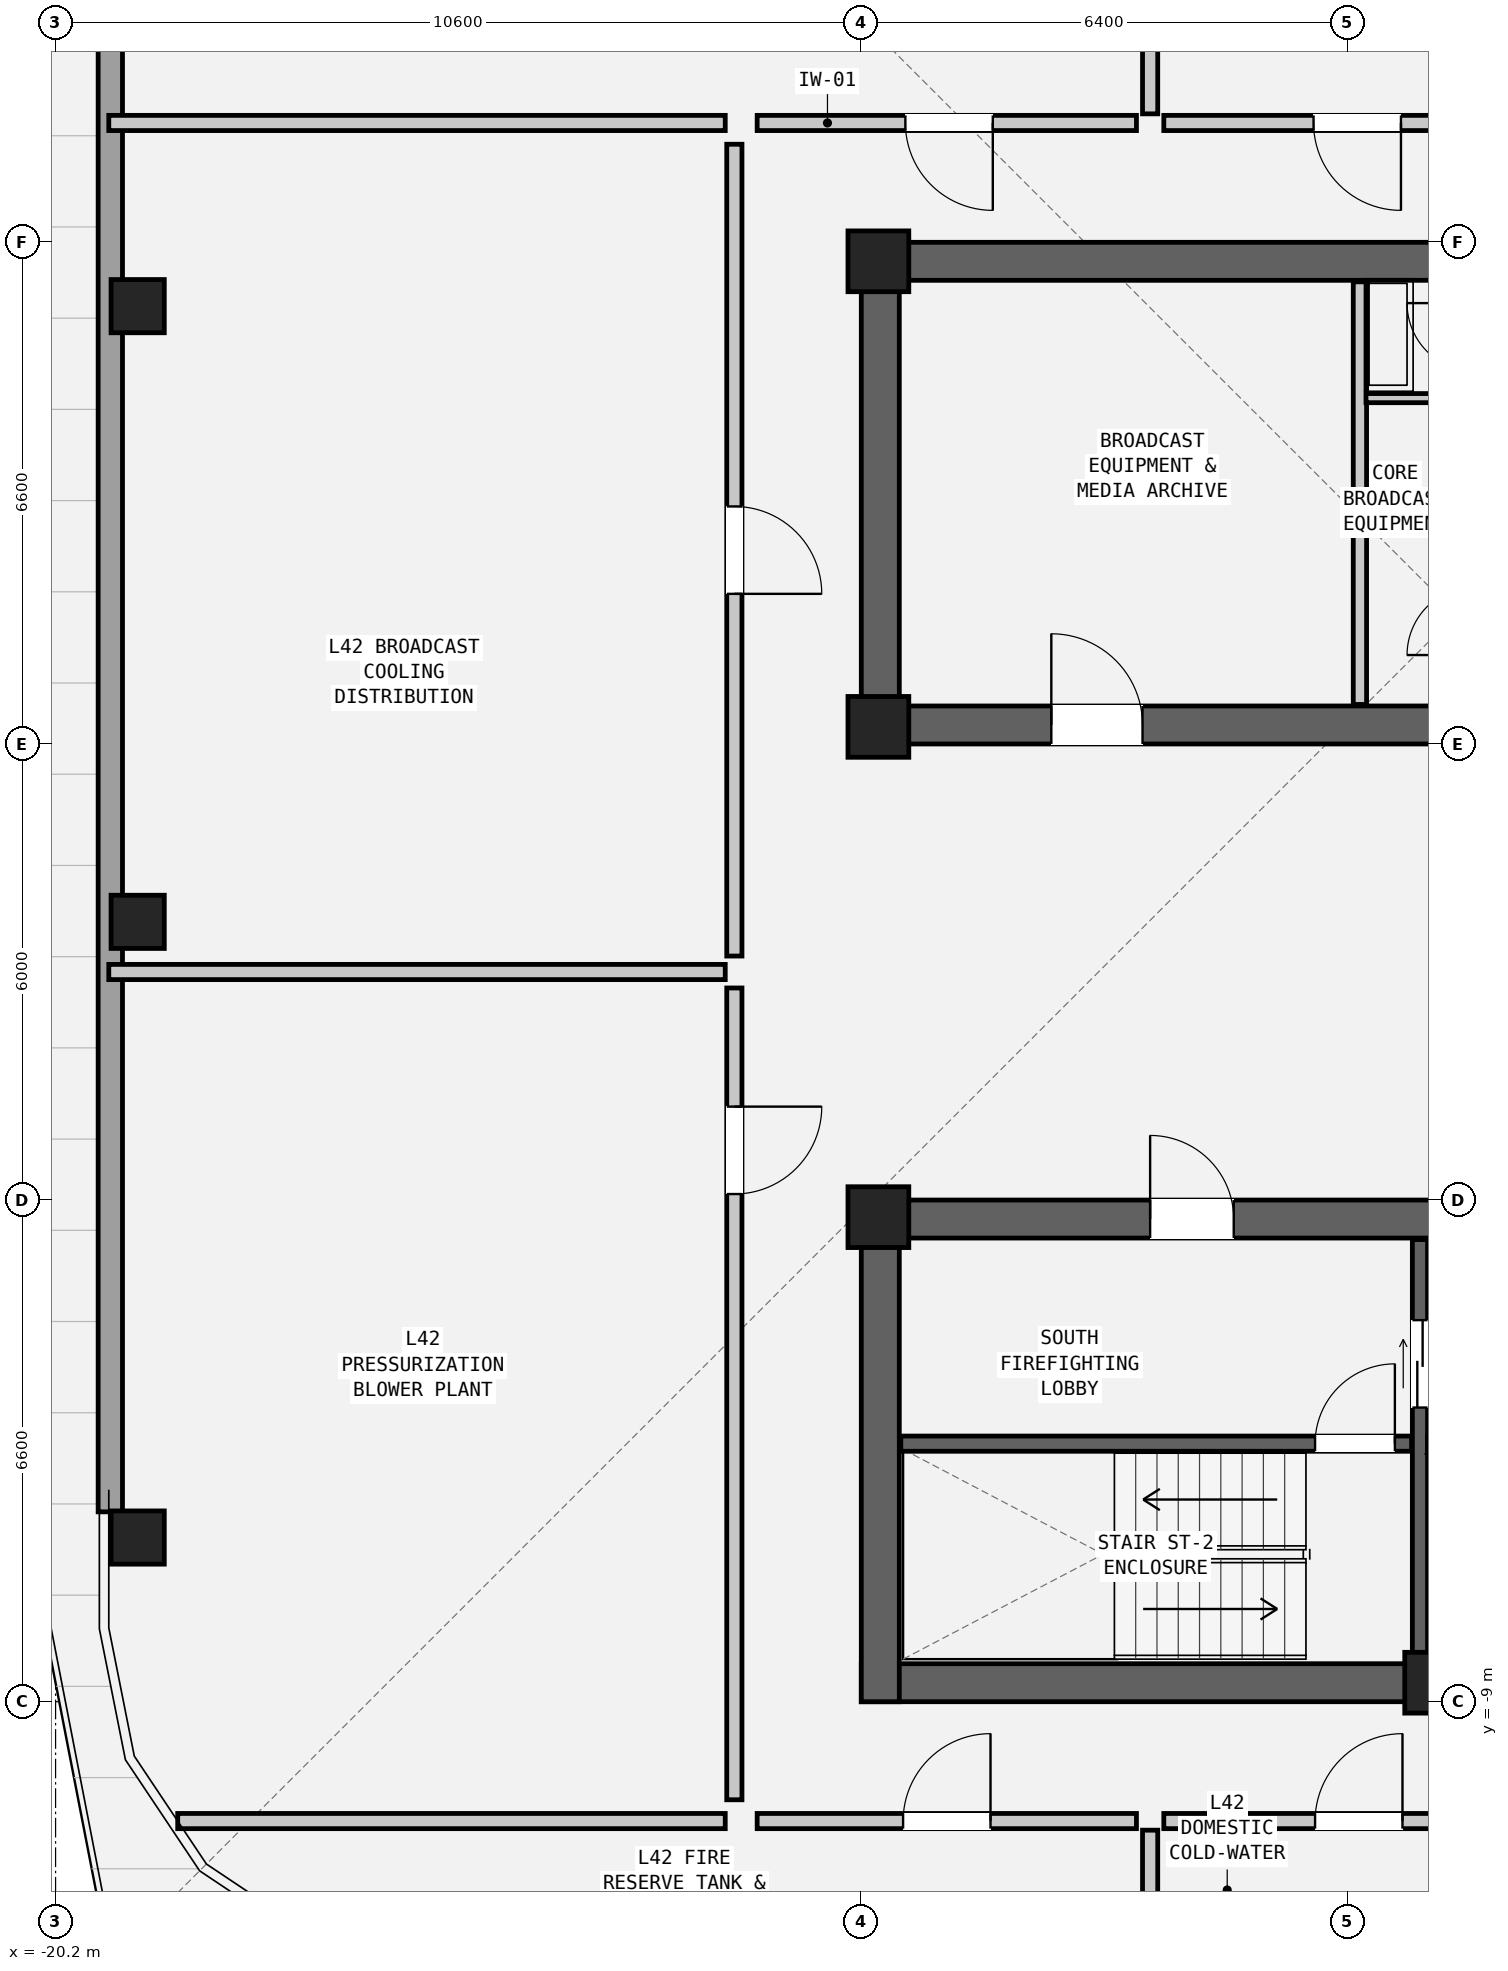
"""IFC4 building model, lengths in metres.
Left out: names, types, materials, properties, quantities, classifications, styles, units other than length and angle.
Written with IfcOpenShell. Run it as: python <this file> out.ifc"""

import sys

from ifc_helpers import new_model, si_unit, direction, frame, frame_2d, origin, origin_2d, place, context, subcontext, project, spatial, rectangle, hollow_rectangle, extrude, element, fill, save


model = new_model("IFC4")
c1 = context("Model", 3, precision=1e-05, world=origin(), true_north=direction((0.0, 1.0)))
c2 = subcontext(c1, "Body", "Model", "MODEL_VIEW")
j1 = project(units=[si_unit("LENGTHUNIT", "METRE"), si_unit("PLANEANGLEUNIT", "RADIAN")], contexts=[c1])
p1 = place(None, origin())
s1 = spatial("IfcSite", under=j1, at=p1, CompositionType="ELEMENT")
p2 = place(p1, origin())
s2 = spatial("IfcBuilding", under=s1, at=p2, CompositionType="ELEMENT")
p3 = place(p2, frame((0.0, 0.0, 144.6)))
s3 = spatial("IfcBuildingStorey", under=s2, at=p3, CompositionType="ELEMENT", Elevation=144.6)
p4 = place(p3, frame((-9.6, 9.95, 0.0), z_axis=(0.0, 0.0, 1.0), x_axis=(1.0, 0.0, 0.0)))
e1 = element("IfcWall", 1, at=p4, inside=s3, PredefinedType="SHEAR", context=c2, shape_type="SweptSolid", body=[
    extrude(rectangle(XDim=19.2, YDim=0.5, at=frame_2d((9.6, 0.0))), origin(), (0.0, 0.0, 1.0), 3.6),
])
p5 = place(p3, frame((-9.6, 3.85, 0.0), z_axis=(0.0, 0.0, 1.0), x_axis=(1.0, 0.0, 0.0)))
e2 = element("IfcWall", 2, at=p5, inside=s3, PredefinedType="SHEAR", context=c2, shape_type="SweptSolid", body=[
    extrude(rectangle(XDim=19.2, YDim=0.5, at=frame_2d((9.6, 0.0))), origin(), (0.0, 0.0, 1.0), 3.6),
])
p6 = place(p5, frame((14.2, 0.0, 0.0)))
e3 = element("IfcOpeningElement", 3, at=p6, cuts=e2, PredefinedType="OPENING", context=c2, shape_type="SweptSolid", body=[
    extrude(rectangle(XDim=1.1, YDim=2.08, at=frame_2d((0.55, 1.04))), frame((0.0, 0.262, 0.0), z_axis=(0.0, -1.0, 0.0), x_axis=(1.0, 0.0, 0.0)), (0.0, 0.0, 1.0), 0.524),
])
p7 = place(p5, frame((8.2, 0.0, 0.0)))
e4 = element("IfcOpeningElement", 4, at=p7, cuts=e2, PredefinedType="OPENING", context=c2, shape_type="SweptSolid", body=[
    extrude(rectangle(XDim=1.15, YDim=2.1, at=frame_2d((0.575, 1.05))), frame((0.0, 0.262, 0.0), z_axis=(0.0, -1.0, 0.0), x_axis=(1.0, 0.0, 0.0)), (0.0, 0.0, 1.0), 0.524),
])
p8 = place(p5, frame((2.5, 0.0, 0.0)))
e5 = element("IfcOpeningElement", 5, at=p8, cuts=e2, PredefinedType="OPENING", context=c2, shape_type="SweptSolid", body=[
    extrude(rectangle(XDim=1.2, YDim=2.1, at=frame_2d((0.6, 1.05))), frame((0.0, 0.262, 0.0), z_axis=(0.0, -1.0, 0.0), x_axis=(1.0, 0.0, 0.0)), (0.0, 0.0, 1.0), 0.524),
])
p9 = place(p3, frame((-9.35, 3.6, 0.0), z_axis=(0.0, 0.0, 1.0), x_axis=(0.0, 1.0, 0.0)))
e6 = element("IfcWall", 6, at=p9, inside=s3, PredefinedType="SHEAR", context=c2, shape_type="SweptSolid", body=[
    extrude(rectangle(XDim=6.6, YDim=0.5, at=frame_2d((3.3, 0.0))), origin(), (0.0, 0.0, 1.0), 3.6),
])
p10 = place(p3, frame((-9.6, -8.75, 0.0), z_axis=(0.0, 0.0, 1.0), x_axis=(1.0, 0.0, 0.0)))
e7 = element("IfcWall", 7, at=p10, inside=s3, PredefinedType="SHEAR", context=c2, shape_type="SweptSolid", body=[
    extrude(rectangle(XDim=19.2, YDim=0.5, at=frame_2d((9.6, 0.0))), origin(), (0.0, 0.0, 1.0), 3.6),
])
p11 = place(p3, frame((-9.6, -2.65, 0.0), z_axis=(0.0, 0.0, 1.0), x_axis=(1.0, 0.0, 0.0)))
e8 = element("IfcWall", 8, at=p11, inside=s3, PredefinedType="SHEAR", context=c2, shape_type="SweptSolid", body=[
    extrude(rectangle(XDim=19.2, YDim=0.5, at=frame_2d((9.6, 0.0))), origin(), (0.0, 0.0, 1.0), 3.6),
])
p12 = place(p11, frame((3.8, 0.0, 0.0)))
e9 = element("IfcOpeningElement", 9, at=p12, cuts=e8, PredefinedType="OPENING", context=c2, shape_type="SweptSolid", body=[
    extrude(rectangle(XDim=1.1, YDim=2.08, at=frame_2d((0.55, 1.04))), frame((0.0, 0.262, 0.0), z_axis=(0.0, -1.0, 0.0), x_axis=(1.0, 0.0, 0.0)), (0.0, 0.0, 1.0), 0.524),
])
p13 = place(p11, frame((13.0, 0.0, 0.0)))
e10 = element("IfcOpeningElement", 10, at=p13, cuts=e8, PredefinedType="OPENING", context=c2, shape_type="SweptSolid", body=[
    extrude(rectangle(XDim=1.6, YDim=2.12, at=frame_2d((0.8, 1.06))), frame((0.0, 0.262, 0.0), z_axis=(0.0, -1.0, 0.0), x_axis=(1.0, 0.0, 0.0)), (0.0, 0.0, 1.0), 0.524),
])
p14 = place(p3, frame((-9.35, -9.0, 0.0), z_axis=(0.0, 0.0, 1.0), x_axis=(0.0, 1.0, 0.0)))
e11 = element("IfcWall", 11, at=p14, inside=s3, PredefinedType="SHEAR", context=c2, shape_type="SweptSolid", body=[
    extrude(rectangle(XDim=6.6, YDim=0.5, at=frame_2d((3.3, 0.0))), origin(), (0.0, 0.0, 1.0), 3.6),
])
for number, where, z_axis, x_axis in (
    (12, (-19.12, 9.36, 0.0), (0.0, 0.0, 1.0), (0.0, 1.0, 0.0)),
    (13, (-19.12, 1.26, 0.0), (0.0, 0.0, 1.0), (0.0, 1.0, 0.0)),
    (14, (-19.12, -6.84, 0.0), (0.0, 0.0, 1.0), (0.0, 1.0, 0.0)),
):
    element("IfcColumn", number, at=place(p3, frame(where, z_axis=z_axis, x_axis=x_axis)), inside=s3, PredefinedType="COLUMN", context=c2, shape_type="SweptSolid", body=[
        extrude(hollow_rectangle(XDim=0.7, YDim=0.7, WallThickness=0.045, at=origin_2d()), origin(), (0.0, 0.0, 1.0), 3.6),
    ])
for number, where, z_axis, x_axis in (
    (15, (-9.375, 9.95, 0.0), (0.0, 0.0, 1.0), (1.0, 0.0, 0.0)),
    (16, (-9.375, 3.825, 0.0), (0.0, 0.0, 1.0), (1.0, 0.0, 0.0)),
    (17, (-9.375, -2.625, 0.0), (0.0, 0.0, 1.0), (1.0, 0.0, 0.0)),
    (18, (-2.05, -8.75, 0.0), (0.0, 0.0, 1.0), (1.0, 0.0, 0.0)),
):
    element("IfcColumn", number, at=place(p3, frame(where, z_axis=z_axis, x_axis=x_axis)), inside=s3, PredefinedType="COLUMN", context=c2, shape_type="SweptSolid", body=[
        extrude(rectangle(XDim=0.8, YDim=0.8, at=origin_2d()), origin(), (0.0, 0.0, 1.0), 3.6),
    ])
p15 = place(p3, frame((-19.48, -6.502, 0.0), z_axis=(0.0, 0.0, 1.0), x_axis=(0.0, 1.0, 0.0)))
e19 = element("IfcWall", 19, at=p15, inside=s3, PredefinedType="SOLIDWALL", context=c2, shape_type="SweptSolid", body=[
    extrude(rectangle(XDim=23.624, YDim=0.32, at=frame_2d((11.812, 0.0))), origin(), (0.0, 0.0, 1.0), 2.242),
])
p16 = place(p3, frame((-3.04, 4.12, 0.0), z_axis=(0.0, 0.0, 1.0), x_axis=(0.0, 1.0, 0.0)))
e20 = element("IfcWall", 20, at=p16, inside=s3, PredefinedType="PARTITIONING", context=c2, shape_type="SweptSolid", body=[
    extrude(rectangle(XDim=5.56, YDim=0.175, at=frame_2d((2.78, 0.0))), origin(), (0.0, 0.0, 1.0), 3.38),
])
p17 = place(p3, frame((-2.96, 8.15, 0.0), z_axis=(0.0, 0.0, 1.0), x_axis=(1.0, 0.0, 0.0)))
e21 = element("IfcWall", 21, at=p17, inside=s3, PredefinedType="PARTITIONING", context=c2, shape_type="SweptSolid", body=[
    extrude(rectangle(XDim=1.36, YDim=0.12, at=frame_2d((0.68, 0.0))), origin(), (0.0, 0.0, 1.0), 3.38),
])
p18 = place(p3, frame((-9.08, -5.605, 0.0), z_axis=(0.0, 0.0, 1.0), x_axis=(1.0, 0.0, 0.0)))
e22 = element("IfcWall", 22, at=p18, inside=s3, PredefinedType="SHEAR", context=c2, shape_type="SweptSolid", body=[
    extrude(rectangle(XDim=6.72, YDim=0.2, at=frame_2d((3.36, 0.0))), origin(), (0.0, 0.0, 1.0), 3.38),
])
p19 = place(p18, frame((5.45, 0.0, 0.0)))
e23 = element("IfcOpeningElement", 23, at=p19, cuts=e22, PredefinedType="OPENING", context=c2, shape_type="SweptSolid", body=[
    extrude(rectangle(XDim=1.05, YDim=2.08, at=frame_2d((0.525, 1.04))), frame((0.0, 0.112, 0.0), z_axis=(0.0, -1.0, 0.0), x_axis=(1.0, 0.0, 0.0)), (0.0, 0.0, 1.0), 0.224),
])
p20 = place(p3, frame((-2.25, -8.48, 0.0), z_axis=(0.0, 0.0, 1.0), x_axis=(0.0, 1.0, 0.0)))
e24 = element("IfcWall", 24, at=p20, inside=s3, PredefinedType="SHEAR", context=c2, shape_type="SweptSolid", body=[
    extrude(rectangle(XDim=5.56, YDim=0.2, at=frame_2d((2.78, 0.0))), origin(), (0.0, 0.0, 1.0), 3.38),
])
p21 = place(p20, frame((3.35, 0.0, 0.0)))
e25 = element("IfcOpeningElement", 25, at=p21, cuts=e24, PredefinedType="OPENING", context=c2, shape_type="SweptSolid", body=[
    extrude(rectangle(XDim=1.15, YDim=2.08, at=frame_2d((0.575, 1.04))), frame((0.0, 0.112, 0.0), z_axis=(0.0, -1.0, 0.0), x_axis=(1.0, 0.0, 0.0)), (0.0, 0.0, 1.0), 0.224),
])
p22 = place(p3, frame((-2.15, -5.6, 0.0), z_axis=(0.0, 0.0, 1.0), x_axis=(1.0, 0.0, 0.0)))
e26 = element("IfcWall", 26, at=p22, inside=s3, PredefinedType="PARTITIONING", context=c2, shape_type="SweptSolid", body=[
    extrude(rectangle(XDim=1.97, YDim=0.175, at=frame_2d((0.985, 0.0))), origin(), (0.0, 0.0, 1.0), 3.38),
])
p23 = place(p3, frame((-5.98, 11.77, 0.0), z_axis=(0.0, 0.0, 1.0), x_axis=(-1.0, 0.0, 0.0)))
e27 = element("IfcWall", 27, at=p23, inside=s3, PredefinedType="PARTITIONING", context=c2, shape_type="SweptSolid", body=[
    extrude(rectangle(XDim=4.99, YDim=0.2, at=frame_2d((2.495, 0.0))), origin(), (0.0, 0.0, 1.0), 3.38),
])
p24 = place(p23, frame((1.89, 0.0, 0.0)))
e28 = element("IfcOpeningElement", 28, at=p24, cuts=e27, PredefinedType="OPENING", context=c2, shape_type="SweptSolid", body=[
    extrude(rectangle(XDim=1.15, YDim=2.1, at=frame_2d((0.575, 1.05))), frame((0.0, 0.112, 0.0), z_axis=(0.0, -1.0, 0.0), x_axis=(1.0, 0.0, 0.0)), (0.0, 0.0, 1.0), 0.224),
])
p25 = place(p3, frame((-5.8, 11.89, 0.0), z_axis=(0.0, 0.0, 1.0), x_axis=(0.0, 1.0, 0.0)))
e29 = element("IfcWall", 29, at=p25, inside=s3, PredefinedType="PARTITIONING", context=c2, shape_type="SweptSolid", body=[
    extrude(rectangle(XDim=11.15, YDim=0.2, at=frame_2d((5.575, 0.0))), origin(), (0.0, 0.0, 1.0), 2.901),
])
p26 = place(p3, frame((-0.53, 11.77, 0.0), z_axis=(0.0, 0.0, 1.0), x_axis=(-1.0, 0.0, 0.0)))
e30 = element("IfcWall", 30, at=p26, inside=s3, PredefinedType="PARTITIONING", context=c2, shape_type="SweptSolid", body=[
    extrude(rectangle(XDim=5.09, YDim=0.2, at=frame_2d((2.545, 0.0))), origin(), (0.0, 0.0, 1.0), 3.38),
])
p27 = place(p26, frame((1.97, 0.0, 0.0)))
e31 = element("IfcOpeningElement", 31, at=p27, cuts=e30, PredefinedType="OPENING", context=c2, shape_type="SweptSolid", body=[
    extrude(rectangle(XDim=1.15, YDim=2.1, at=frame_2d((0.575, 1.05))), frame((0.0, 0.112, 0.0), z_axis=(0.0, -1.0, 0.0), x_axis=(1.0, 0.0, 0.0)), (0.0, 0.0, 1.0), 0.224),
])
p28 = place(p3, frame((-10.97, -10.57, 0.0), z_axis=(0.0, 0.0, 1.0), x_axis=(1.0, 0.0, 0.0)))
e32 = element("IfcWall", 32, at=p28, inside=s3, PredefinedType="PARTITIONING", context=c2, shape_type="SweptSolid", body=[
    extrude(rectangle(XDim=4.99, YDim=0.2, at=frame_2d((2.495, 0.0))), origin(), (0.0, 0.0, 1.0), 3.38),
])
p29 = place(p28, frame((1.92, 0.0, 0.0)))
e33 = element("IfcOpeningElement", 33, at=p29, cuts=e32, PredefinedType="OPENING", context=c2, shape_type="SweptSolid", body=[
    extrude(rectangle(XDim=1.15, YDim=2.1, at=frame_2d((0.575, 1.05))), frame((0.0, 0.112, 0.0), z_axis=(0.0, -1.0, 0.0), x_axis=(1.0, 0.0, 0.0)), (0.0, 0.0, 1.0), 0.224),
])
p30 = place(p3, frame((-5.8, -12.42, 0.0), z_axis=(0.0, 0.0, 1.0), x_axis=(0.0, 1.0, 0.0)))
e34 = element("IfcWall", 34, at=p30, inside=s3, PredefinedType="PARTITIONING", context=c2, shape_type="SweptSolid", body=[
    extrude(rectangle(XDim=1.73, YDim=0.2, at=frame_2d((0.865, 0.0))), origin(), (0.0, 0.0, 1.0), 2.901),
])
p31 = place(p3, frame((-5.62, -10.57, 0.0), z_axis=(0.0, 0.0, 1.0), x_axis=(1.0, 0.0, 0.0)))
e35 = element("IfcWall", 35, at=p31, inside=s3, PredefinedType="PARTITIONING", context=c2, shape_type="SweptSolid", body=[
    extrude(rectangle(XDim=5.09, YDim=0.2, at=frame_2d((2.545, 0.0))), origin(), (0.0, 0.0, 1.0), 3.38),
])
p32 = place(p31, frame((1.99, 0.0, 0.0)))
e36 = element("IfcOpeningElement", 36, at=p32, cuts=e35, PredefinedType="OPENING", context=c2, shape_type="SweptSolid", body=[
    extrude(rectangle(XDim=1.15, YDim=2.1, at=frame_2d((0.575, 1.05))), frame((0.0, 0.112, 0.0), z_axis=(0.0, -1.0, 0.0), x_axis=(1.0, 0.0, 0.0)), (0.0, 0.0, 1.0), 0.224),
])
p33 = place(p3, frame((-19.5, 11.77, 0.0), z_axis=(0.0, 0.0, 1.0), x_axis=(1.0, 0.0, 0.0)))
e37 = element("IfcWall", 37, at=p33, inside=s3, PredefinedType="PARTITIONING", context=c2, shape_type="SweptSolid", body=[
    extrude(rectangle(XDim=8.11, YDim=0.2, at=frame_2d((4.055, 0.0))), origin(), (0.0, 0.0, 1.0), 3.38),
])
p34 = place(p3, frame((-18.593, -10.57, 0.0), z_axis=(0.0, 0.0, 1.0), x_axis=(1.0, 0.0, 0.0)))
e38 = element("IfcWall", 38, at=p34, inside=s3, PredefinedType="PARTITIONING", context=c2, shape_type="SweptSolid", body=[
    extrude(rectangle(XDim=7.203, YDim=0.2, at=frame_2d((3.602, 0.0))), origin(), (0.0, 0.0, 1.0), 3.38),
])
p35 = place(p3, frame((-19.5, 0.6, 0.0), z_axis=(0.0, 0.0, 1.0), x_axis=(1.0, 0.0, 0.0)))
e39 = element("IfcWall", 39, at=p35, inside=s3, PredefinedType="PARTITIONING", context=c2, shape_type="SweptSolid", body=[
    extrude(rectangle(XDim=8.11, YDim=0.2, at=frame_2d((4.055, 0.0))), origin(), (0.0, 0.0, 1.0), 2.901),
])
p36 = place(p3, frame((-11.27, 0.39, 0.0), z_axis=(0.0, 0.0, 1.0), x_axis=(0.0, -1.0, 0.0)))
e40 = element("IfcWall", 40, at=p36, inside=s3, PredefinedType="PARTITIONING", context=c2, shape_type="SweptSolid", body=[
    extrude(rectangle(XDim=10.68, YDim=0.2, at=frame_2d((5.34, 0.0))), origin(), (0.0, 0.0, 1.0), 3.38),
])
p37 = place(p36, frame((1.561, 0.0, 0.0)))
e41 = element("IfcOpeningElement", 41, at=p37, cuts=e40, PredefinedType="OPENING", context=c2, shape_type="SweptSolid", body=[
    extrude(rectangle(XDim=1.15, YDim=2.1, at=frame_2d((0.575, 1.05))), frame((0.0, 0.112, 0.0), z_axis=(0.0, -1.0, 0.0), x_axis=(1.0, 0.0, 0.0)), (0.0, 0.0, 1.0), 0.224),
])
p38 = place(p3, frame((-11.27, 11.49, 0.0), z_axis=(0.0, 0.0, 1.0), x_axis=(0.0, -1.0, 0.0)))
e42 = element("IfcWall", 42, at=p38, inside=s3, PredefinedType="PARTITIONING", context=c2, shape_type="SweptSolid", body=[
    extrude(rectangle(XDim=10.68, YDim=0.2, at=frame_2d((5.34, 0.0))), origin(), (0.0, 0.0, 1.0), 3.38),
])
p39 = place(p38, frame((4.765, 0.0, 0.0)))
e43 = element("IfcOpeningElement", 43, at=p39, cuts=e42, PredefinedType="OPENING", context=c2, shape_type="SweptSolid", body=[
    extrude(rectangle(XDim=1.15, YDim=2.1, at=frame_2d((0.575, 1.05))), frame((0.0, 0.112, 0.0), z_axis=(0.0, -1.0, 0.0), x_axis=(1.0, 0.0, 0.0)), (0.0, 0.0, 1.0), 0.224),
])
p40 = place(p8, origin())
e44 = element("IfcDoor", 44, at=p40, inside=s3, OperationType="SINGLE_SWING_LEFT", PredefinedType="DOOR", context=c2, shape_type="SweptSolid", body=[
    extrude(rectangle(XDim=1.2, YDim=2.1, at=frame_2d((0.6, 1.05))), frame((0.0, 0.025, 0.0), z_axis=(0.0, -1.0, 0.0), x_axis=(1.0, 0.0, 0.0)), (0.0, 0.0, 1.0), 0.05),
])
fill(e5, e44)
p41 = place(p19, origin())
e45 = element("IfcDoor", 45, at=p41, inside=s3, OperationType="SINGLE_SWING_RIGHT", PredefinedType="DOOR", context=c2, shape_type="SweptSolid", body=[
    extrude(rectangle(XDim=1.05, YDim=2.08, at=frame_2d((0.525, 1.04))), frame((0.0, 0.025, 0.0), z_axis=(0.0, -1.0, 0.0), x_axis=(1.0, 0.0, 0.0)), (0.0, 0.0, 1.0), 0.05),
])
fill(e23, e45)
p42 = place(p12, origin())
e46 = element("IfcDoor", 46, at=p42, inside=s3, OperationType="SINGLE_SWING_LEFT", PredefinedType="DOOR", context=c2, shape_type="SweptSolid", body=[
    extrude(rectangle(XDim=1.1, YDim=2.08, at=frame_2d((0.55, 1.04))), frame((0.0, 0.025, 0.0), z_axis=(0.0, -1.0, 0.0), x_axis=(1.0, 0.0, 0.0)), (0.0, 0.0, 1.0), 0.05),
])
fill(e9, e46)
p43 = place(p21, origin())
e47 = element("IfcDoor", 47, at=p43, inside=s3, OperationType="DOUBLE_DOOR_SLIDING", PredefinedType="DOOR", context=c2, shape_type="SweptSolid", body=[
    extrude(rectangle(XDim=1.15, YDim=2.08, at=frame_2d((0.575, 1.04))), frame((0.0, 0.025, 0.0), z_axis=(0.0, -1.0, 0.0), x_axis=(1.0, 0.0, 0.0)), (0.0, 0.0, 1.0), 0.05),
])
fill(e25, e47)
p44 = place(p24, origin())
e48 = element("IfcDoor", 48, at=p44, inside=s3, OperationType="SINGLE_SWING_LEFT", PredefinedType="DOOR", context=c2, shape_type="SweptSolid", body=[
    extrude(rectangle(XDim=1.15, YDim=2.1, at=frame_2d((0.575, 1.05))), frame((0.0, 0.025, 0.0), z_axis=(0.0, -1.0, 0.0), x_axis=(1.0, 0.0, 0.0)), (0.0, 0.0, 1.0), 0.05),
])
fill(e28, e48)
p45 = place(p27, origin())
e49 = element("IfcDoor", 49, at=p45, inside=s3, OperationType="SINGLE_SWING_LEFT", PredefinedType="DOOR", context=c2, shape_type="SweptSolid", body=[
    extrude(rectangle(XDim=1.15, YDim=2.1, at=frame_2d((0.575, 1.05))), frame((0.0, 0.025, 0.0), z_axis=(0.0, -1.0, 0.0), x_axis=(1.0, 0.0, 0.0)), (0.0, 0.0, 1.0), 0.05),
])
fill(e31, e49)
p46 = place(p29, origin())
e50 = element("IfcDoor", 50, at=p46, inside=s3, OperationType="SINGLE_SWING_RIGHT", PredefinedType="DOOR", context=c2, shape_type="SweptSolid", body=[
    extrude(rectangle(XDim=1.15, YDim=2.1, at=frame_2d((0.575, 1.05))), frame((0.0, 0.025, 0.0), z_axis=(0.0, -1.0, 0.0), x_axis=(1.0, 0.0, 0.0)), (0.0, 0.0, 1.0), 0.05),
])
fill(e33, e50)
p47 = place(p32, origin())
e51 = element("IfcDoor", 51, at=p47, inside=s3, OperationType="SINGLE_SWING_RIGHT", PredefinedType="DOOR", context=c2, shape_type="SweptSolid", body=[
    extrude(rectangle(XDim=1.15, YDim=2.1, at=frame_2d((0.575, 1.05))), frame((0.0, 0.025, 0.0), z_axis=(0.0, -1.0, 0.0), x_axis=(1.0, 0.0, 0.0)), (0.0, 0.0, 1.0), 0.05),
])
fill(e36, e51)
p48 = place(p37, origin())
e52 = element("IfcDoor", 52, at=p48, inside=s3, OperationType="SINGLE_SWING_LEFT", PredefinedType="DOOR", context=c2, shape_type="SweptSolid", body=[
    extrude(rectangle(XDim=1.15, YDim=2.1, at=frame_2d((0.575, 1.05))), frame((0.0, 0.025, 0.0), z_axis=(0.0, -1.0, 0.0), x_axis=(1.0, 0.0, 0.0)), (0.0, 0.0, 1.0), 0.05),
])
fill(e41, e52)
p49 = place(p39, origin())
e53 = element("IfcDoor", 53, at=p49, inside=s3, OperationType="SINGLE_SWING_RIGHT", PredefinedType="DOOR", context=c2, shape_type="SweptSolid", body=[
    extrude(rectangle(XDim=1.15, YDim=2.1, at=frame_2d((0.575, 1.05))), frame((0.0, 0.025, 0.0), z_axis=(0.0, -1.0, 0.0), x_axis=(1.0, 0.0, 0.0)), (0.0, 0.0, 1.0), 0.05),
])
fill(e43, e53)
save(model, sys.argv[1])
